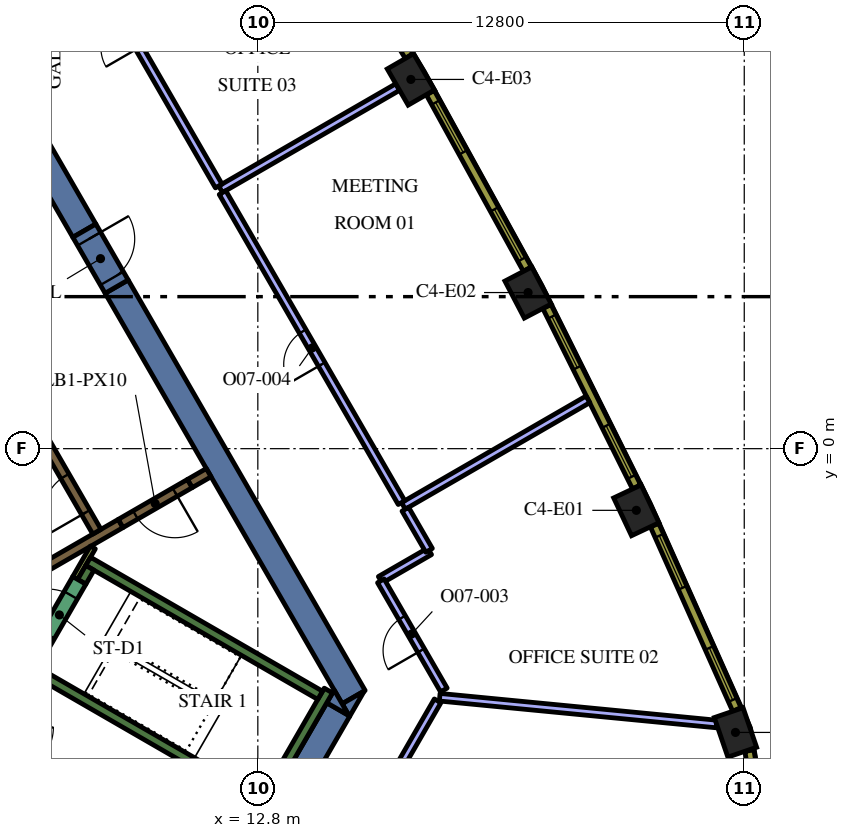
"""IFC4 building model, lengths in metres.
Left out: names, types, materials, properties, quantities, classifications, styles, units other than length and angle.
Written with IfcOpenShell. Run it as: python <this file> out.ifc"""

import sys

from ifc_helpers import new_model, si_unit, direction, frame, frame_2d, origin, origin_2d, place, context, subcontext, project, spatial, polyline, rectangle, outline, extrude, element, fill, save


model = new_model("IFC4")
c1 = context("Model", 3, precision=1e-05, world=origin(), true_north=direction((0.0, 1.0)))
c2 = subcontext(c1, "Body", "Model", "MODEL_VIEW")
j1 = project(units=[si_unit("LENGTHUNIT", "METRE"), si_unit("PLANEANGLEUNIT", "RADIAN")], contexts=[c1])
p1 = place(None, origin())
s1 = spatial("IfcSite", under=j1, at=p1, CompositionType="ELEMENT")
p2 = place(p1, origin())
s2 = spatial("IfcBuilding", under=s1, at=p2, CompositionType="ELEMENT")
p3 = place(p2, frame((0.0, 0.0, 222.6)))
s3 = spatial("IfcBuildingStorey", under=s2, at=p3, CompositionType="ELEMENT", Elevation=222.6)
for number, where, z_axis, x_axis in (
    (1, (25.369, -7.466, 0.0), (0.0, 0.0, 1.0), (-0.324, 0.946, 0.0)),
    (2, (22.76, -1.623, 0.0), (0.0, 0.0, 1.0), (-0.426, 0.905, 0.0)),
    (3, (19.912, 4.108, 0.0), (0.0, 0.0, 1.0), (-0.464, 0.886, 0.0)),
    (4, (16.827, 9.715, 0.0), (0.0, 0.0, 1.0), (-0.5, 0.866, 0.0)),
):
    element("IfcColumn", number, at=place(p3, frame(where, z_axis=z_axis, x_axis=x_axis)), inside=s3, PredefinedType="COLUMN", context=c2, shape_type="SweptSolid", body=[
        extrude(rectangle(XDim=1.1, YDim=0.8, at=origin_2d()), origin(), (0.0, 0.0, 1.0), 4.2),
    ])
p4 = place(p3, frame((9.085, 4.264, 0.0), z_axis=(0.0, 0.0, 1.0), x_axis=(0.499998082512, -0.866026510844, 0.0)))
e5 = element("IfcWall", 5, at=p4, inside=s3, PredefinedType="SOLIDWALL", context=c2, shape_type="SweptSolid", body=[
    extrude(rectangle(XDim=12.472, YDim=0.7, at=frame_2d((6.236, 0.0))), origin(), (0.0, 0.0, 1.0), 4.2),
])
p5 = place(p3, origin())
e6 = element("IfcWall", 6, at=p5, inside=s3, PredefinedType="SOLIDWALL", context=c2, shape_type="SweptSolid", body=[
    extrude(outline(polyline([(15.213, -7.05), (15.019, -6.714), (15.601, -6.378), (15.213, -7.05)])), origin(), (0.0, 0.0, 1.0), 4.2),
])
p6 = place(p3, frame((13.003, -10.179, 0.0), z_axis=(0.0, 0.0, 1.0), x_axis=(0.499972675833, 0.866041178825, 0.0)))
e7 = element("IfcWall", 7, at=p6, inside=s3, PredefinedType="SOLIDWALL", context=c2, shape_type="SweptSolid", body=[
    extrude(rectangle(XDim=3.829, YDim=0.7, at=frame_2d((1.915, 0.0))), origin(), (0.0, 0.0, 1.0), 4.2),
])
e8 = element("IfcWall", 8, at=p5, inside=s3, PredefinedType="SOLIDWALL", context=c2, shape_type="SweptSolid", body=[
    extrude(outline(polyline([(14.809, -6.35), (15.197, -7.022), (14.615, -6.686), (14.809, -6.35)])), origin(), (0.0, 0.0, 1.0), 4.2),
])
p7 = place(p3, frame((5.571, 10.35, 0.0), z_axis=(0.0, 0.0, 1.0), x_axis=(0.499968379186, -0.8660436593, 0.0)))
e9 = element("IfcWall", 9, at=p7, inside=s3, PredefinedType="SOLIDWALL", context=c2, shape_type="SweptSolid", body=[
    extrude(rectangle(XDim=5.328, YDim=0.7, at=frame_2d((2.664, 0.0))), origin(), (0.0, 0.0, 1.0), 4.2),
])
p8 = place(p3, frame((12.84, -9.511, 0.0), z_axis=(0.0, 0.0, 1.0), x_axis=(0.500048121057, 0.865997619297, 0.0)))
e10 = element("IfcWall", 10, at=p8, inside=s3, PredefinedType="SOLIDWALL", context=c2, shape_type="SweptSolid", body=[
    extrude(rectangle(XDim=3.634, YDim=0.25, at=frame_2d((1.817, 0.0))), origin(), (0.0, 0.0, 1.0), 4.2),
])
p9 = place(p3, frame((12.84, -9.261, 0.0), z_axis=(0.0, 0.0, 1.0), x_axis=(-0.866013990052, 0.500019768644, 0.0)))
e11 = element("IfcWall", 11, at=p9, inside=s3, PredefinedType="SOLIDWALL", context=c2, shape_type="SweptSolid", body=[
    extrude(rectangle(XDim=6.8, YDim=0.25, at=frame_2d((3.4, 0.0))), origin(), (0.0, 0.0, 1.0), 4.2),
])
p10 = place(p3, frame((8.334, -2.964, 0.0), z_axis=(0.0, 0.0, 1.0), x_axis=(0.866016039709, -0.500016218704, 0.0)))
e12 = element("IfcWall", 12, at=p10, inside=s3, PredefinedType="SOLIDWALL", context=c2, shape_type="SweptSolid", body=[
    extrude(rectangle(XDim=7.05, YDim=0.25, at=frame_2d((3.525, 0.0))), origin(), (0.0, 0.0, 1.0), 4.2),
])
p11 = place(p3, frame((8.168, -3.503, 0.0), z_axis=(0.0, 0.0, 1.0), x_axis=(0.49972245349, 0.866185586049, 0.0)))
e13 = element("IfcWall", 13, at=p11, inside=s3, PredefinedType="SOLIDWALL", context=c2, shape_type="SweptSolid", body=[
    extrude(rectangle(XDim=0.425, YDim=0.25, at=frame_2d((0.212, 0.0))), origin(), (0.0, 0.0, 1.0), 4.2),
])
p12 = place(p3, frame((9.19, -1.969, 0.0), z_axis=(0.0, 0.0, 1.0), x_axis=(-0.866057109641, -0.499945079824, 0.0)))
e14 = element("IfcWall", 14, at=p12, inside=s3, PredefinedType="SOLIDWALL", context=c2, shape_type="SweptSolid", body=[
    extrude(rectangle(XDim=3.291, YDim=0.25, at=frame_2d((1.646, 0.0))), origin(), (0.0, 0.0, 1.0), 4.2),
])
p13 = place(p3, frame((11.507, -0.631, 0.0), z_axis=(0.0, 0.0, 1.0), x_axis=(-0.866093731455, -0.499881634324, 0.0)))
e15 = element("IfcWall", 15, at=p13, inside=s3, PredefinedType="SOLIDWALL", context=c2, shape_type="SweptSolid", body=[
    extrude(rectangle(XDim=0.575, YDim=0.25, at=frame_2d((0.288, 0.0))), origin(), (0.0, 0.0, 1.0), 4.2),
])
p14 = place(p3, frame((8.459, -2.599, 0.0), z_axis=(0.0, 0.0, 1.0), x_axis=(-0.500041054325, -0.866001699761, 0.0)))
e16 = element("IfcWall", 16, at=p14, inside=s3, PredefinedType="PARTITIONING", context=c2, shape_type="SweptSolid", body=[
    extrude(rectangle(XDim=0.929, YDim=0.15, at=frame_2d((0.464, 0.0))), origin(), (0.0, 0.0, 1.0), 4.2),
])
p15 = place(p3, frame((8.565, -2.185, 0.0), z_axis=(0.0, 0.0, 1.0), x_axis=(-0.499997954832, 0.866026584559, 0.0)))
e17 = element("IfcWall", 17, at=p15, inside=s3, PredefinedType="SOLIDWALL", context=c2, shape_type="SweptSolid", body=[
    extrude(rectangle(XDim=12.35, YDim=0.25, at=frame_2d((6.175, 0.0))), origin(), (0.0, 0.0, 1.0), 4.2),
])
p16 = place(p15, frame((0.585, 0.0, 0.0)))
e18 = element("IfcOpeningElement", 18, at=p16, cuts=e17, PredefinedType="OPENING", context=c2, shape_type="SweptSolid", body=[
    extrude(rectangle(XDim=1.1, YDim=2.1, at=frame_2d((0.55, 1.05))), frame((0.0, 0.135, 0.0), z_axis=(0.0, -1.0, 0.0), x_axis=(1.0, 0.0, 0.0)), (0.0, 0.0, 1.0), 0.27),
])
p17 = place(p3, frame((7.053, -5.284, 0.0), z_axis=(0.0, 0.0, 1.0), x_axis=(0.500078061341, 0.865980330357, 0.0)))
e19 = element("IfcWall", 19, at=p17, inside=s3, PredefinedType="SOLIDWALL", context=c2, shape_type="SweptSolid", body=[
    extrude(rectangle(XDim=2.1, YDim=0.4, at=frame_2d((1.05, 0.0))), origin(), (0.0, 0.0, 1.0), 4.2),
])
p18 = place(p17, frame((0.45, 0.0, 0.0)))
e20 = element("IfcOpeningElement", 20, at=p18, cuts=e19, PredefinedType="OPENING", context=c2, shape_type="SweptSolid", body=[
    extrude(rectangle(XDim=1.2, YDim=2.1, at=frame_2d((0.6, 1.05))), frame((0.0, 0.21, 0.0), z_axis=(0.0, -1.0, 0.0), x_axis=(1.0, 0.0, 0.0)), (0.0, 0.0, 1.0), 0.42),
])
p19 = place(p3, frame((11.009, -0.919, 0.0), z_axis=(0.0, 0.0, 1.0), x_axis=(-0.866059744384, -0.49994051562, 0.0)))
e21 = element("IfcWall", 21, at=p19, inside=s3, PredefinedType="SOLIDWALL", context=c2, shape_type="SweptSolid", body=[
    extrude(rectangle(XDim=2.1, YDim=0.25, at=frame_2d((1.05, 0.0))), origin(), (0.0, 0.0, 1.0), 4.2),
])
p20 = place(p19, frame((0.45, 0.0, 0.0)))
e22 = element("IfcOpeningElement", 22, at=p20, cuts=e21, PredefinedType="OPENING", context=c2, shape_type="SweptSolid", body=[
    extrude(rectangle(XDim=1.2, YDim=2.1, at=frame_2d((0.6, 1.05))), frame((0.0, 0.135, 0.0), z_axis=(0.0, -1.0, 0.0), x_axis=(1.0, 0.0, 0.0)), (0.0, 0.0, 1.0), 0.27),
])
p21 = place(p3, frame((8.235, 5.736, 0.0), z_axis=(0.0, 0.0, 1.0), x_axis=(0.499954529098, -0.86605165483, 0.0)))
e23 = element("IfcWall", 23, at=p21, inside=s3, PredefinedType="SOLIDWALL", context=c2, shape_type="SweptSolid", body=[
    extrude(rectangle(XDim=1.7, YDim=0.7, at=frame_2d((0.85, 0.0))), origin(), (0.0, 0.0, 1.0), 4.2),
])
p22 = place(p21, frame((0.25, 0.0, 0.0)))
e24 = element("IfcOpeningElement", 24, at=p22, cuts=e23, PredefinedType="OPENING", context=c2, shape_type="SweptSolid", body=[
    extrude(rectangle(XDim=1.2, YDim=2.1, at=frame_2d((0.6, 1.05))), frame((0.0, 0.36, 0.0), z_axis=(0.0, -1.0, 0.0), x_axis=(1.0, 0.0, 0.0)), (0.0, 0.0, 1.0), 0.72),
])
p23 = place(p3, frame((17.586, -6.54, 0.0), z_axis=(0.0, 0.0, 1.0), x_axis=(0.995357542522, -0.096246363795, 0.0)))
e25 = element("IfcWall", 25, at=p23, inside=s3, PredefinedType="PARTITIONING", context=c2, shape_type="SweptSolid", body=[
    extrude(rectangle(XDim=7.318, YDim=0.2, at=frame_2d((3.659, 0.0))), origin(), (0.0, 0.0, 1.0), 3.45),
])
p24 = place(p3, frame((14.362, -12.124, 0.0), z_axis=(0.0, 0.0, 1.0), x_axis=(0.500017005442, 0.866015585465, 0.0)))
e26 = element("IfcWall", 26, at=p24, inside=s3, PredefinedType="PARTITIONING", context=c2, shape_type="SweptSolid", body=[
    extrude(rectangle(XDim=6.338, YDim=0.2, at=frame_2d((3.169, 0.0))), origin(), (0.0, 0.0, 1.0), 3.45),
])
p25 = place(p3, frame((16.631, -1.506, 0.0), z_axis=(0.0, 0.0, 1.0), x_axis=(0.866045655253, 0.499964921787, 0.0)))
e27 = element("IfcWall", 27, at=p25, inside=s3, PredefinedType="PARTITIONING", context=c2, shape_type="SweptSolid", body=[
    extrude(rectangle(XDim=5.607, YDim=0.2, at=frame_2d((2.804, 0.0))), origin(), (0.0, 0.0, 1.0), 3.45),
])
p26 = place(p3, frame((16.022, -3.451, 0.0), z_axis=(0.0, 0.0, 1.0), x_axis=(0.866031096941, 0.499990139034, 0.0)))
e28 = element("IfcWall", 28, at=p26, inside=s3, PredefinedType="PARTITIONING", context=c2, shape_type="SweptSolid", body=[
    extrude(rectangle(XDim=1.5, YDim=0.2, at=frame_2d((0.75, 0.0))), origin(), (0.0, 0.0, 1.0), 3.45),
])
p27 = place(p3, frame((17.306, -2.675, 0.0), z_axis=(0.0, 0.0, 1.0), x_axis=(-0.499919672301, 0.866071776036, 0.0)))
e29 = element("IfcWall", 29, at=p27, inside=s3, PredefinedType="PARTITIONING", context=c2, shape_type="SweptSolid", body=[
    extrude(rectangle(XDim=1.25, YDim=0.2, at=frame_2d((0.625, 0.0))), origin(), (0.0, 0.0, 1.0), 3.45),
])
p28 = place(p3, frame((17.696, -6.35, 0.0), z_axis=(0.0, 0.0, 1.0), x_axis=(-0.500017629075, 0.866015225394, 0.0)))
e30 = element("IfcWall", 30, at=p28, inside=s3, PredefinedType="PARTITIONING", context=c2, shape_type="SweptSolid", body=[
    extrude(rectangle(XDim=3.317, YDim=0.2, at=frame_2d((1.659, 0.0))), origin(), (0.0, 0.0, 1.0), 3.45),
])
p29 = place(p28, frame((1.2, 0.0, 0.0)))
e31 = element("IfcOpeningElement", 31, at=p29, cuts=e30, PredefinedType="OPENING", context=c2, shape_type="SweptSolid", body=[
    extrude(rectangle(XDim=1.0, YDim=2.1, at=frame_2d((0.5, 1.05))), frame((0.0, 0.11, 0.0), z_axis=(0.0, -1.0, 0.0), x_axis=(1.0, 0.0, 0.0)), (0.0, 0.0, 1.0), 0.22),
])
p30 = place(p3, frame((11.821, 6.825, 0.0), z_axis=(0.0, 0.0, 1.0), x_axis=(0.866011792348, 0.500023574959, 0.0)))
e32 = element("IfcWall", 32, at=p30, inside=s3, PredefinedType="PARTITIONING", context=c2, shape_type="SweptSolid", body=[
    extrude(rectangle(XDim=5.381, YDim=0.2, at=frame_2d((2.69, 0.0))), origin(), (0.0, 0.0, 1.0), 3.45),
])
p31 = place(p3, frame((16.581, -1.419, 0.0), z_axis=(0.0, 0.0, 1.0), x_axis=(-0.500019350398, 0.866014231539, 0.0)))
e33 = element("IfcWall", 33, at=p31, inside=s3, PredefinedType="PARTITIONING", context=c2, shape_type="SweptSolid", body=[
    extrude(rectangle(XDim=9.42, YDim=0.2, at=frame_2d((4.71, 0.0))), origin(), (0.0, 0.0, 1.0), 3.45),
])
p32 = place(p31, frame((4.2, 0.0, 0.0)))
e34 = element("IfcOpeningElement", 34, at=p32, cuts=e33, PredefinedType="OPENING", context=c2, shape_type="SweptSolid", body=[
    extrude(rectangle(XDim=1.0, YDim=2.1, at=frame_2d((0.5, 1.05))), frame((0.0, 0.11, 0.0), z_axis=(0.0, -1.0, 0.0), x_axis=(1.0, 0.0, 0.0)), (0.0, 0.0, 1.0), 0.22),
])
p33 = place(p3, frame((11.771, 6.912, 0.0), z_axis=(0.0, 0.0, 1.0), x_axis=(-0.500008127286, 0.866020711443, 0.0)))
e35 = element("IfcWall", 35, at=p33, inside=s3, PredefinedType="PARTITIONING", context=c2, shape_type="SweptSolid", body=[
    extrude(rectangle(XDim=9.42, YDim=0.2, at=frame_2d((4.71, 0.0))), origin(), (0.0, 0.0, 1.0), 3.45),
])
p34 = place(p33, frame((4.2, 0.0, 0.0)))
e36 = element("IfcOpeningElement", 36, at=p34, cuts=e35, PredefinedType="OPENING", context=c2, shape_type="SweptSolid", body=[
    extrude(rectangle(XDim=1.0, YDim=2.1, at=frame_2d((0.5, 1.05))), frame((0.0, 0.11, 0.0), z_axis=(0.0, -1.0, 0.0), x_axis=(1.0, 0.0, 0.0)), (0.0, 0.0, 1.0), 0.22),
])
p35 = place(p3, frame((26.172, -10.517, 0.0), z_axis=(0.0, 0.0, 1.0), x_axis=(-0.167660055546, 0.985844869021, 0.0)))
e37 = element("IfcWall", 37, at=p35, inside=s3, PredefinedType="SOLIDWALL", context=c2, shape_type="SweptSolid", body=[
    extrude(rectangle(XDim=2.609, YDim=0.24, at=frame_2d((1.305, 0.0))), origin(), (0.0, 0.0, 1.0), 3.95),
])
p36 = place(p35, frame((0.805, 0.0, 0.9)))
e38 = element("IfcOpeningElement", 38, at=p36, cuts=e37, PredefinedType="OPENING", context=c2, shape_type="SweptSolid", body=[
    extrude(rectangle(XDim=1.0, YDim=2.55, at=frame_2d((0.5, 1.275))), frame((0.0, 0.13, 0.0), z_axis=(0.0, -1.0, 0.0), x_axis=(1.0, 0.0, 0.0)), (0.0, 0.0, 1.0), 0.26),
])
p37 = place(p3, frame((25.405, -6.861, 0.0), z_axis=(0.0, 0.0, 1.0), x_axis=(-0.407579651789, 0.913169659728, 0.0)))
e39 = element("IfcWall", 39, at=p37, inside=s3, PredefinedType="SOLIDWALL", context=c2, shape_type="SweptSolid", body=[
    extrude(rectangle(XDim=5.311, YDim=0.24, at=frame_2d((2.655, 0.0))), origin(), (0.0, 0.0, 1.0), 3.95),
])
p38 = place(p37, frame((0.271, 0.0, 0.9)))
e40 = element("IfcOpeningElement", 40, at=p38, cuts=e39, PredefinedType="OPENING", context=c2, shape_type="SweptSolid", body=[
    extrude(rectangle(XDim=1.5, YDim=2.55, at=frame_2d((0.75, 1.275))), frame((0.0, 0.13, 0.0), z_axis=(0.0, -1.0, 0.0), x_axis=(1.0, 0.0, 0.0)), (0.0, 0.0, 1.0), 0.26),
])
p39 = place(p37, frame((3.504, 0.0, 0.9)))
e41 = element("IfcOpeningElement", 41, at=p39, cuts=e39, PredefinedType="OPENING", context=c2, shape_type="SweptSolid", body=[
    extrude(rectangle(XDim=1.5, YDim=2.55, at=frame_2d((0.75, 1.275))), frame((0.0, 0.13, 0.0), z_axis=(0.0, -1.0, 0.0), x_axis=(1.0, 0.0, 0.0)), (0.0, 0.0, 1.0), 0.26),
])
p40 = place(p3, frame((22.766, -1.005, 0.0), z_axis=(0.0, 0.0, 1.0), x_axis=(-0.445129582031, 0.895466166419, 0.0)))
e42 = element("IfcWall", 42, at=p40, inside=s3, PredefinedType="SOLIDWALL", context=c2, shape_type="SweptSolid", body=[
    extrude(rectangle(XDim=5.298, YDim=0.24, at=frame_2d((2.649, 0.0))), origin(), (0.0, 0.0, 1.0), 3.95),
])
p41 = place(p40, frame((0.295, 0.0, 0.9)))
e43 = element("IfcOpeningElement", 43, at=p41, cuts=e42, PredefinedType="OPENING", context=c2, shape_type="SweptSolid", body=[
    extrude(rectangle(XDim=1.5, YDim=2.55, at=frame_2d((0.75, 1.275))), frame((0.0, 0.13, 0.0), z_axis=(0.0, -1.0, 0.0), x_axis=(1.0, 0.0, 0.0)), (0.0, 0.0, 1.0), 0.26),
])
p42 = place(p40, frame((3.504, 0.0, 0.9)))
e44 = element("IfcOpeningElement", 44, at=p42, cuts=e42, PredefinedType="OPENING", context=c2, shape_type="SweptSolid", body=[
    extrude(rectangle(XDim=1.5, YDim=2.55, at=frame_2d((0.75, 1.275))), frame((0.0, 0.13, 0.0), z_axis=(0.0, -1.0, 0.0), x_axis=(1.0, 0.0, 0.0)), (0.0, 0.0, 1.0), 0.26),
])
p43 = place(p3, frame((19.892, 4.725, 0.0), z_axis=(0.0, 0.0, 1.0), x_axis=(-0.481925825015, 0.876212017256, 0.0)))
e45 = element("IfcWall", 45, at=p43, inside=s3, PredefinedType="SOLIDWALL", context=c2, shape_type="SweptSolid", body=[
    extrude(rectangle(XDim=5.299, YDim=0.24, at=frame_2d((2.649, 0.0))), origin(), (0.0, 0.0, 1.0), 3.95),
])
p44 = place(p43, frame((0.295, 0.0, 0.9)))
e46 = element("IfcOpeningElement", 46, at=p44, cuts=e45, PredefinedType="OPENING", context=c2, shape_type="SweptSolid", body=[
    extrude(rectangle(XDim=1.5, YDim=2.55, at=frame_2d((0.75, 1.275))), frame((0.0, 0.13, 0.0), z_axis=(0.0, -1.0, 0.0), x_axis=(1.0, 0.0, 0.0)), (0.0, 0.0, 1.0), 0.26),
])
p45 = place(p43, frame((3.504, 0.0, 0.9)))
e47 = element("IfcOpeningElement", 47, at=p45, cuts=e45, PredefinedType="OPENING", context=c2, shape_type="SweptSolid", body=[
    extrude(rectangle(XDim=1.5, YDim=2.55, at=frame_2d((0.75, 1.275))), frame((0.0, 0.13, 0.0), z_axis=(0.0, -1.0, 0.0), x_axis=(1.0, 0.0, 0.0)), (0.0, 0.0, 1.0), 0.26),
])
p46 = place(p3, frame((16.782, 10.331, 0.0), z_axis=(0.0, 0.0, 1.0), x_axis=(-0.517846166225, 0.855473756538, 0.0)))
e48 = element("IfcWall", 48, at=p46, inside=s3, PredefinedType="SOLIDWALL", context=c2, shape_type="SweptSolid", body=[
    extrude(rectangle(XDim=5.298, YDim=0.24, at=frame_2d((2.649, 0.0))), origin(), (0.0, 0.0, 1.0), 3.95),
])
p47 = place(p46, frame((0.294, 0.0, 0.9)))
e49 = element("IfcOpeningElement", 49, at=p47, cuts=e48, PredefinedType="OPENING", context=c2, shape_type="SweptSolid", body=[
    extrude(rectangle(XDim=1.5, YDim=2.55, at=frame_2d((0.75, 1.275))), frame((0.0, 0.13, 0.0), z_axis=(0.0, -1.0, 0.0), x_axis=(1.0, 0.0, 0.0)), (0.0, 0.0, 1.0), 0.26),
])
p48 = place(p46, frame((3.504, 0.0, 0.9)))
e50 = element("IfcOpeningElement", 50, at=p48, cuts=e48, PredefinedType="OPENING", context=c2, shape_type="SweptSolid", body=[
    extrude(rectangle(XDim=1.5, YDim=2.55, at=frame_2d((0.75, 1.275))), frame((0.0, 0.13, 0.0), z_axis=(0.0, -1.0, 0.0), x_axis=(1.0, 0.0, 0.0)), (0.0, 0.0, 1.0), 0.26),
])
p49 = place(p16, origin())
e51 = element("IfcDoor", 51, at=p49, inside=s3, OperationType="DOUBLE_DOOR_SLIDING", PredefinedType="DOOR", context=c2, shape_type="SweptSolid", body=[
    extrude(rectangle(XDim=1.1, YDim=2.1, at=frame_2d((0.55, 1.05))), frame((0.0, 0.025, 0.0), z_axis=(0.0, -1.0, 0.0), x_axis=(1.0, 0.0, 0.0)), (0.0, 0.0, 1.0), 0.05),
])
fill(e18, e51)
p50 = place(p18, origin())
e52 = element("IfcDoor", 52, at=p50, inside=s3, OperationType="SINGLE_SWING_LEFT", PredefinedType="DOOR", context=c2, shape_type="SweptSolid", body=[
    extrude(rectangle(XDim=1.2, YDim=2.1, at=frame_2d((0.6, 1.05))), frame((0.0, 0.025, 0.0), z_axis=(0.0, -1.0, 0.0), x_axis=(1.0, 0.0, 0.0)), (0.0, 0.0, 1.0), 0.05),
])
fill(e20, e52)
p51 = place(p20, origin())
e53 = element("IfcDoor", 53, at=p51, inside=s3, OperationType="SINGLE_SWING_LEFT", PredefinedType="DOOR", context=c2, shape_type="SweptSolid", body=[
    extrude(rectangle(XDim=1.2, YDim=2.1, at=frame_2d((0.6, 1.05))), frame((0.0, 0.025, 0.0), z_axis=(0.0, -1.0, 0.0), x_axis=(1.0, 0.0, 0.0)), (0.0, 0.0, 1.0), 0.05),
])
fill(e22, e53)
p52 = place(p22, origin())
e54 = element("IfcDoor", 54, at=p52, inside=s3, OperationType="SINGLE_SWING_LEFT", PredefinedType="DOOR", context=c2, shape_type="SweptSolid", body=[
    extrude(rectangle(XDim=1.2, YDim=2.1, at=frame_2d((0.6, 1.05))), frame((0.0, 0.025, 0.0), z_axis=(0.0, -1.0, 0.0), x_axis=(1.0, 0.0, 0.0)), (0.0, 0.0, 1.0), 0.05),
])
fill(e24, e54)
p53 = place(p29, origin())
e55 = element("IfcDoor", 55, at=p53, inside=s3, OperationType="SINGLE_SWING_RIGHT", PredefinedType="DOOR", context=c2, shape_type="SweptSolid", body=[
    extrude(rectangle(XDim=1.0, YDim=2.1, at=frame_2d((0.5, 1.05))), frame((0.0, 0.025, 0.0), z_axis=(0.0, -1.0, 0.0), x_axis=(1.0, 0.0, 0.0)), (0.0, 0.0, 1.0), 0.05),
])
fill(e31, e55)
p54 = place(p32, origin())
e56 = element("IfcDoor", 56, at=p54, inside=s3, OperationType="SINGLE_SWING_LEFT", PredefinedType="DOOR", context=c2, shape_type="SweptSolid", body=[
    extrude(rectangle(XDim=1.0, YDim=2.1, at=frame_2d((0.5, 1.05))), frame((0.0, 0.025, 0.0), z_axis=(0.0, -1.0, 0.0), x_axis=(1.0, 0.0, 0.0)), (0.0, 0.0, 1.0), 0.05),
])
fill(e34, e56)
p55 = place(p38, origin())
e57 = element("IfcWindow", 57, at=p55, inside=s3, PartitioningType="SINGLE_PANEL", PredefinedType="WINDOW", context=c2, shape_type="SweptSolid", body=[
    extrude(rectangle(XDim=1.5, YDim=2.55, at=frame_2d((0.75, 1.275))), frame((0.0, 0.04, 0.0), z_axis=(0.0, -1.0, 0.0), x_axis=(1.0, 0.0, 0.0)), (0.0, 0.0, 1.0), 0.06),
])
fill(e40, e57)
p56 = place(p39, origin())
e58 = element("IfcWindow", 58, at=p56, inside=s3, PartitioningType="SINGLE_PANEL", PredefinedType="WINDOW", context=c2, shape_type="SweptSolid", body=[
    extrude(rectangle(XDim=1.5, YDim=2.55, at=frame_2d((0.75, 1.275))), frame((0.0, 0.04, 0.0), z_axis=(0.0, -1.0, 0.0), x_axis=(1.0, 0.0, 0.0)), (0.0, 0.0, 1.0), 0.06),
])
fill(e41, e58)
p57 = place(p41, origin())
e59 = element("IfcWindow", 59, at=p57, inside=s3, PartitioningType="SINGLE_PANEL", PredefinedType="WINDOW", context=c2, shape_type="SweptSolid", body=[
    extrude(rectangle(XDim=1.5, YDim=2.55, at=frame_2d((0.75, 1.275))), frame((0.0, 0.04, 0.0), z_axis=(0.0, -1.0, 0.0), x_axis=(1.0, 0.0, 0.0)), (0.0, 0.0, 1.0), 0.06),
])
fill(e43, e59)
p58 = place(p42, origin())
e60 = element("IfcWindow", 60, at=p58, inside=s3, PartitioningType="SINGLE_PANEL", PredefinedType="WINDOW", context=c2, shape_type="SweptSolid", body=[
    extrude(rectangle(XDim=1.5, YDim=2.55, at=frame_2d((0.75, 1.275))), frame((0.0, 0.04, 0.0), z_axis=(0.0, -1.0, 0.0), x_axis=(1.0, 0.0, 0.0)), (0.0, 0.0, 1.0), 0.06),
])
fill(e44, e60)
p59 = place(p44, origin())
e61 = element("IfcWindow", 61, at=p59, inside=s3, PartitioningType="SINGLE_PANEL", PredefinedType="WINDOW", context=c2, shape_type="SweptSolid", body=[
    extrude(rectangle(XDim=1.5, YDim=2.55, at=frame_2d((0.75, 1.275))), frame((0.0, 0.04, 0.0), z_axis=(0.0, -1.0, 0.0), x_axis=(1.0, 0.0, 0.0)), (0.0, 0.0, 1.0), 0.06),
])
fill(e46, e61)
p60 = place(p45, origin())
e62 = element("IfcWindow", 62, at=p60, inside=s3, PartitioningType="SINGLE_PANEL", PredefinedType="WINDOW", context=c2, shape_type="SweptSolid", body=[
    extrude(rectangle(XDim=1.5, YDim=2.55, at=frame_2d((0.75, 1.275))), frame((0.0, 0.04, 0.0), z_axis=(0.0, -1.0, 0.0), x_axis=(1.0, 0.0, 0.0)), (0.0, 0.0, 1.0), 0.06),
])
fill(e47, e62)
save(model, sys.argv[1])
